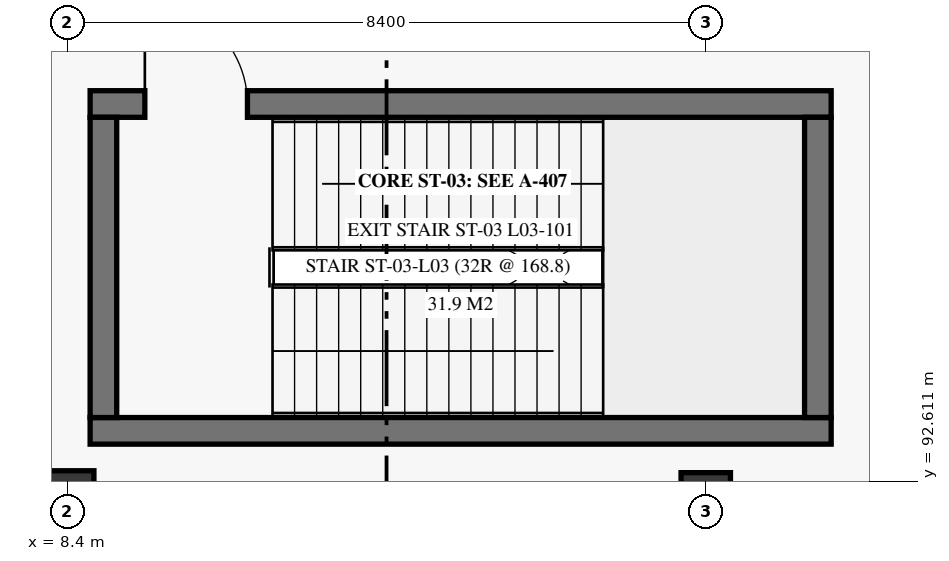
"""IFC4 building model, lengths in metres.
Left out: names, types, materials, properties, quantities, classifications, styles, units other than length and angle.
Written with IfcOpenShell. Run it as: python <this file> out.ifc"""

import sys

from ifc_helpers import new_model, si_unit, direction, frame, frame_2d, origin, origin_2d, place, context, subcontext, project, spatial, rectangle, extrude, element, fill, save


model = new_model("IFC4")
c1 = context("Model", 3, precision=1e-05, world=origin(), true_north=direction((0.0, 1.0)))
c2 = subcontext(c1, "Body", "Model", "MODEL_VIEW")
j1 = project(units=[si_unit("LENGTHUNIT", "METRE"), si_unit("PLANEANGLEUNIT", "RADIAN")], contexts=[c1])
p1 = place(None, origin())
s1 = spatial("IfcSite", under=j1, at=p1, CompositionType="ELEMENT")
p2 = place(p1, origin())
s2 = spatial("IfcBuilding", under=s1, at=p2, CompositionType="ELEMENT")
p3 = place(p2, frame((0.0, 0.0, 11.4)))
s3 = spatial("IfcBuildingStorey", under=s2, at=p3, CompositionType="ELEMENT", Elevation=11.4)
p4 = place(p3, frame((8.4, 92.4, 0.0), z_axis=(0.0, 0.0, 1.0), x_axis=(1.0, 0.0, 0.0)))
e1 = element("IfcColumn", 1, at=p4, inside=s3, PredefinedType="COLUMN", context=c2, shape_type="SweptSolid", body=[
    extrude(rectangle(XDim=0.7, YDim=0.7, at=origin_2d()), origin(), (0.0, 0.0, 1.0), 5.1),
])
p5 = place(p3, frame((16.8, 92.4, 0.0), z_axis=(0.0, 0.0, 1.0), x_axis=(1.0, 0.0, 0.0)))
e2 = element("IfcColumn", 2, at=p5, inside=s3, PredefinedType="COLUMN", context=c2, shape_type="SweptSolid", body=[
    extrude(rectangle(XDim=0.65, YDim=0.65, at=origin_2d()), origin(), (0.0, 0.0, 1.0), 5.1),
])
p6 = place(p3, frame((8.7, 93.275, 0.0), z_axis=(0.0, 0.0, 1.0), x_axis=(1.0, 0.0, 0.0)))
e3 = element("IfcWall", 3, at=p6, inside=s3, PredefinedType="SHEAR", context=c2, shape_type="SweptSolid", body=[
    extrude(rectangle(XDim=9.75, YDim=0.35, at=frame_2d((4.875, 0.0))), origin(), (0.0, 0.0, 1.0), 5.1),
])
p7 = place(p3, frame((8.7, 97.575, 0.0), z_axis=(0.0, 0.0, 1.0), x_axis=(1.0, 0.0, 0.0)))
e4 = element("IfcWall", 4, at=p7, inside=s3, PredefinedType="SHEAR", context=c2, shape_type="SweptSolid", body=[
    extrude(rectangle(XDim=9.75, YDim=0.35, at=frame_2d((4.875, 0.0))), origin(), (0.0, 0.0, 1.0), 5.1),
])
p8 = place(p7, frame((0.72, 0.0, 0.0)))
e5 = element("IfcOpeningElement", 5, at=p8, cuts=e4, PredefinedType="OPENING", context=c2, shape_type="SweptSolid", body=[
    extrude(rectangle(XDim=1.35, YDim=2.25, at=frame_2d((0.675, 1.125))), frame((0.0, 0.185, 0.0), z_axis=(0.0, -1.0, 0.0), x_axis=(1.0, 0.0, 0.0)), (0.0, 0.0, 1.0), 0.37),
])
for number, where, z_axis, x_axis in (
    (6, (8.875, 93.45, 0.0), (0.0, 0.0, 1.0), (0.0, 1.0, 0.0)),
    (7, (18.275, 93.45, 0.0), (0.0, 0.0, 1.0), (0.0, 1.0, 0.0)),
):
    element("IfcWall", number, at=place(p3, frame(where, z_axis=z_axis, x_axis=x_axis)), inside=s3, PredefinedType="SHEAR", context=c2, shape_type="SweptSolid", body=[
        extrude(rectangle(XDim=3.95, YDim=0.35, at=frame_2d((1.975, 0.0))), origin(), (0.0, 0.0, 1.0), 5.1),
    ])
p9 = place(p8, origin())
e8 = element("IfcDoor", 8, at=p9, inside=s3, OperationType="SINGLE_SWING_LEFT", PredefinedType="DOOR", context=c2, shape_type="SweptSolid", body=[
    extrude(rectangle(XDim=1.35, YDim=2.25, at=frame_2d((0.675, 1.125))), frame((0.0, 0.025, 0.0), z_axis=(0.0, -1.0, 0.0), x_axis=(1.0, 0.0, 0.0)), (0.0, 0.0, 1.0), 0.05),
])
fill(e5, e8)
save(model, sys.argv[1])
